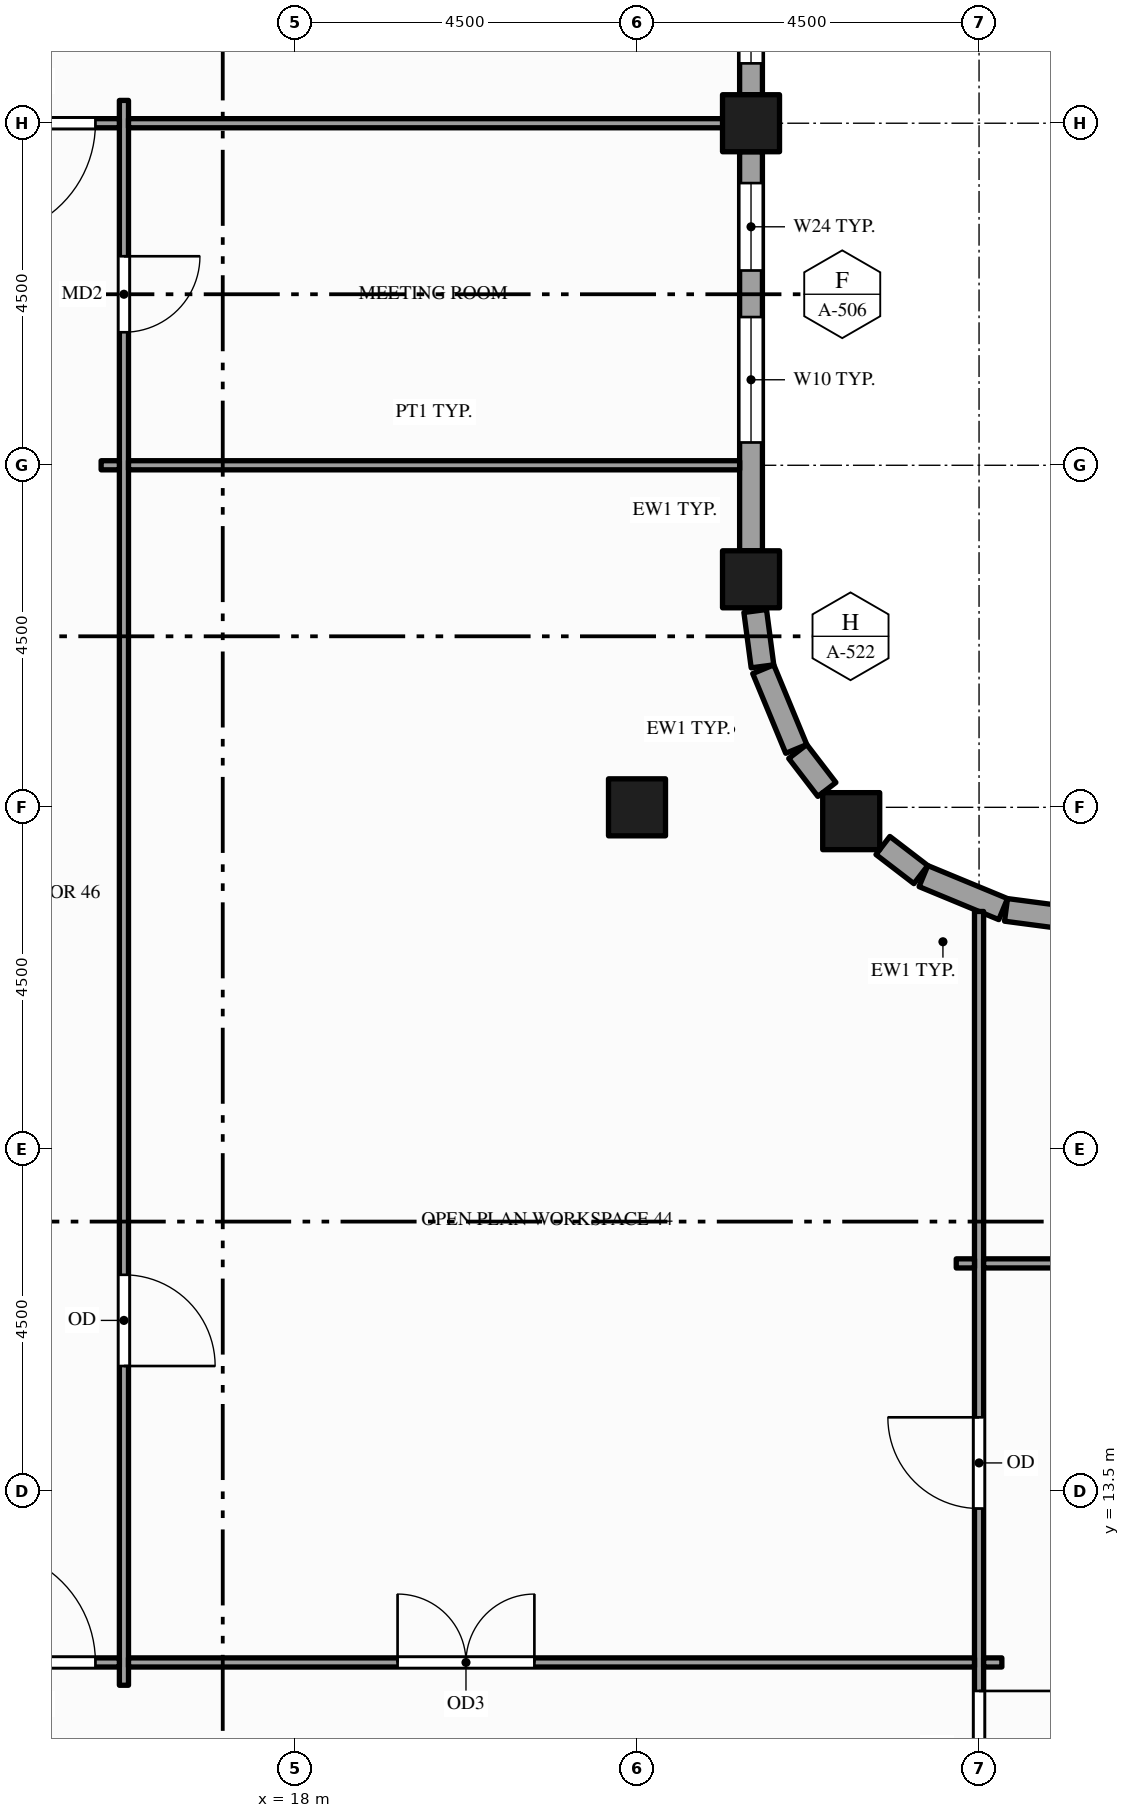
"""IFC4 building model, lengths in metres.
Left out: names, types, materials, properties, quantities, classifications, styles, units other than length and angle.
Written with IfcOpenShell. Run it as: python <this file> out.ifc"""

import sys

from ifc_helpers import new_model, si_unit, direction, frame, frame_2d, origin, origin_2d, place, context, subcontext, project, spatial, rectangle, hollow_rectangle, extrude, element, fill, save


model = new_model("IFC4")
c1 = context("Model", 3, precision=1e-05, world=origin(), true_north=direction((0.0, 1.0)))
c2 = subcontext(c1, "Body", "Model", "MODEL_VIEW")
j1 = project(units=[si_unit("LENGTHUNIT", "METRE"), si_unit("PLANEANGLEUNIT", "RADIAN")], contexts=[c1])
p1 = place(None, origin())
s1 = spatial("IfcSite", under=j1, at=p1, CompositionType="ELEMENT")
p2 = place(p1, origin())
s2 = spatial("IfcBuilding", under=s1, at=p2, CompositionType="ELEMENT")
p3 = place(p2, frame((0.0, 0.0, 227.0)))
s3 = spatial("IfcBuildingStorey", under=s2, at=p3, CompositionType="ELEMENT", Elevation=227.0)
for number, where, z_axis, x_axis in (
    (1, (22.5, 22.5, -0.15), (0.0, 0.0, 1.0), (1.0, 0.0, 0.0)),
    (2, (24.0, 25.5, -0.15), (0.0, 0.0, 1.0), (1.0, 0.0, 0.0)),
    (3, (24.0, 31.5, -0.15), (0.0, 0.0, 1.0), (1.0, 0.0, 0.0)),
    (4, (25.318, 22.318, -0.15), (0.0, 0.0, 1.0), (1.0, 0.0, 0.0)),
):
    element("IfcColumn", number, at=place(p3, frame(where, z_axis=z_axis, x_axis=x_axis)), inside=s3, PredefinedType="COLUMN", context=c2, shape_type="SweptSolid", body=[
        extrude(hollow_rectangle(XDim=0.75, YDim=0.75, WallThickness=0.036, at=origin_2d()), origin(), (0.0, 0.0, 1.0), 4.0),
    ])
p4 = place(p3, frame((28.083, 21.055, 0.0), z_axis=(0.0, 0.0, 1.0), x_axis=(-0.99142711513, 0.130660917588, 0.0)))
e5 = element("IfcWall", 5, at=p4, inside=s3, PredefinedType="STANDARD", context=c2, shape_type="SweptSolid", body=[
    extrude(rectangle(XDim=0.734, YDim=0.3, at=frame_2d((0.367, 0.0))), origin(), (0.0, 0.0, 1.0), 3.157),
])
p5 = place(p3, frame((27.317, 21.161, 0.0), z_axis=(0.0, 0.0, 1.0), x_axis=(-0.923914616768, 0.382598720491, 0.0)))
e6 = element("IfcWall", 6, at=p5, inside=s3, PredefinedType="STANDARD", context=c2, shape_type="SweptSolid", body=[
    extrude(rectangle(XDim=1.135, YDim=0.3, at=frame_2d((0.568, 0.0))), origin(), (0.0, 0.0, 1.0), 2.87),
])
p6 = place(p3, frame((26.234, 21.615, 0.0), z_axis=(0.0, 0.0, 1.0), x_axis=(-0.793575131083, 0.608472276547, 0.0)))
e7 = element("IfcWall", 7, at=p6, inside=s3, PredefinedType="STANDARD", context=c2, shape_type="SweptSolid", body=[
    extrude(rectangle(XDim=0.629, YDim=0.3, at=frame_2d((0.314, 0.0))), origin(), (0.0, 0.0, 1.0), 3.157),
])
p7 = place(p3, frame((24.998, 22.735, 0.0), z_axis=(0.0, 0.0, 1.0), x_axis=(-0.608472276547, 0.793575131083, 0.0)))
e8 = element("IfcWall", 8, at=p7, inside=s3, PredefinedType="STANDARD", context=c2, shape_type="SweptSolid", body=[
    extrude(rectangle(XDim=0.629, YDim=0.3, at=frame_2d((0.314, 0.0))), origin(), (0.0, 0.0, 1.0), 2.76),
])
p8 = place(p3, frame((24.595, 23.268, 0.0), z_axis=(0.0, 0.0, 1.0), x_axis=(-0.382598720491, 0.923914616768, 0.0)))
e9 = element("IfcWall", 9, at=p8, inside=s3, PredefinedType="STANDARD", context=c2, shape_type="SweptSolid", body=[
    extrude(rectangle(XDim=1.135, YDim=0.3, at=frame_2d((0.568, 0.0))), origin(), (0.0, 0.0, 1.0), 2.76),
])
p9 = place(p3, frame((24.151, 24.355, 0.0), z_axis=(0.0, 0.0, 1.0), x_axis=(-0.130660917588, 0.99142711513, 0.0)))
e10 = element("IfcWall", 10, at=p9, inside=s3, PredefinedType="STANDARD", context=c2, shape_type="SweptSolid", body=[
    extrude(rectangle(XDim=0.734, YDim=0.3, at=frame_2d((0.367, 0.0))), origin(), (0.0, 0.0, 1.0), 3.157),
])
p10 = place(p3, frame((24.0, 25.875, 0.0), z_axis=(0.0, 0.0, 1.0), x_axis=(0.0, 1.0, 0.0)))
e11 = element("IfcWall", 11, at=p10, inside=s3, PredefinedType="STANDARD", context=c2, shape_type="SweptSolid", body=[
    extrude(rectangle(XDim=5.25, YDim=0.3, at=frame_2d((2.625, 0.0))), origin(), (0.0, 0.0, 1.0), 3.157),
])
p11 = place(p10, frame((1.425, 0.0, 0.9)))
e12 = element("IfcOpeningElement", 12, at=p11, cuts=e11, PredefinedType="OPENING", context=c2, shape_type="SweptSolid", body=[
    extrude(rectangle(XDim=1.65, YDim=2.0, at=frame_2d((0.825, 1.0))), frame((0.0, 0.16, 0.0), z_axis=(0.0, -1.0, 0.0), x_axis=(1.0, 0.0, 0.0)), (0.0, 0.0, 1.0), 0.32),
])
p12 = place(p10, frame((3.688, 0.0, 0.9)))
e13 = element("IfcOpeningElement", 13, at=p12, cuts=e11, PredefinedType="OPENING", context=c2, shape_type="SweptSolid", body=[
    extrude(rectangle(XDim=1.15, YDim=2.0, at=frame_2d((0.575, 1.0))), frame((0.0, 0.16, 0.0), z_axis=(0.0, -1.0, 0.0), x_axis=(1.0, 0.0, 0.0)), (0.0, 0.0, 1.0), 0.32),
])
p13 = place(p3, frame((24.0, 31.875, 0.0), z_axis=(0.0, 0.0, 1.0), x_axis=(0.0, 1.0, 0.0)))
e14 = element("IfcWall", 14, at=p13, inside=s3, PredefinedType="STANDARD", context=c2, shape_type="SweptSolid", body=[
    extrude(rectangle(XDim=3.75, YDim=0.3, at=frame_2d((1.875, 0.0))), origin(), (0.0, 0.0, 1.0), 3.157),
])
p14 = place(p13, frame((0.413, 0.0, 0.9)))
e15 = element("IfcOpeningElement", 15, at=p14, cuts=e14, PredefinedType="OPENING", context=c2, shape_type="SweptSolid", body=[
    extrude(rectangle(XDim=1.15, YDim=2.0, at=frame_2d((0.575, 1.0))), frame((0.0, 0.16, 0.0), z_axis=(0.0, -1.0, 0.0), x_axis=(1.0, 0.0, 0.0)), (0.0, 0.0, 1.0), 0.32),
])
p15 = place(p13, frame((2.188, 0.0, 0.9)))
e16 = element("IfcOpeningElement", 16, at=p15, cuts=e14, PredefinedType="OPENING", context=c2, shape_type="SweptSolid", body=[
    extrude(rectangle(XDim=1.15, YDim=2.0, at=frame_2d((0.575, 1.0))), frame((0.0, 0.16, 0.0), z_axis=(0.0, -1.0, 0.0), x_axis=(1.0, 0.0, 0.0)), (0.0, 0.0, 1.0), 0.32),
])
p16 = place(p3, frame((15.75, 10.95, 0.0), z_axis=(0.0, 0.0, 1.0), x_axis=(0.0, 1.0, 0.0)))
e17 = element("IfcWall", 17, at=p16, inside=s3, PredefinedType="PARTITIONING", context=c2, shape_type="SweptSolid", body=[
    extrude(rectangle(XDim=20.85, YDim=0.12, at=frame_2d((10.425, 0.0))), origin(), (0.0, 0.0, 1.0), 2.6),
])
p17 = place(p16, frame((17.8, 0.0, 0.0)))
e18 = element("IfcOpeningElement", 18, at=p17, cuts=e17, PredefinedType="OPENING", context=c2, shape_type="SweptSolid", body=[
    extrude(rectangle(XDim=1.0, YDim=2.1, at=frame_2d((0.5, 1.05))), frame((0.0, 0.07, 0.0), z_axis=(0.0, -1.0, 0.0), x_axis=(1.0, 0.0, 0.0)), (0.0, 0.0, 1.0), 0.14),
])
p18 = place(p16, frame((4.2, 0.0, 0.0)))
e19 = element("IfcOpeningElement", 19, at=p18, cuts=e17, PredefinedType="OPENING", context=c2, shape_type="SweptSolid", body=[
    extrude(rectangle(XDim=1.2, YDim=2.1, at=frame_2d((0.6, 1.05))), frame((0.0, 0.07, 0.0), z_axis=(0.0, -1.0, 0.0), x_axis=(1.0, 0.0, 0.0)), (0.0, 0.0, 1.0), 0.14),
])
p19 = place(p3, frame((27.0, -1.35, 0.0), z_axis=(0.0, 0.0, 1.0), x_axis=(0.0, 1.0, 0.0)))
e20 = element("IfcWall", 20, at=p19, inside=s3, PredefinedType="PARTITIONING", context=c2, shape_type="SweptSolid", body=[
    extrude(rectangle(XDim=22.48, YDim=0.12, at=frame_2d((11.24, 0.0))), origin(), (0.0, 0.0, 1.0), 2.87),
])
p20 = place(p19, frame((10.725, 0.0, 0.0)))
e21 = element("IfcOpeningElement", 21, at=p20, cuts=e20, PredefinedType="OPENING", context=c2, shape_type="SweptSolid", body=[
    extrude(rectangle(XDim=1.5, YDim=2.1, at=frame_2d((0.75, 1.05))), frame((0.0, 0.07, 0.0), z_axis=(0.0, -1.0, 0.0), x_axis=(1.0, 0.0, 0.0)), (0.0, 0.0, 1.0), 0.14),
])
p21 = place(p19, frame((14.625, 0.0, 0.0)))
e22 = element("IfcOpeningElement", 22, at=p21, cuts=e20, PredefinedType="OPENING", context=c2, shape_type="SweptSolid", body=[
    extrude(rectangle(XDim=1.2, YDim=2.1, at=frame_2d((0.6, 1.05))), frame((0.0, 0.07, 0.0), z_axis=(0.0, -1.0, 0.0), x_axis=(1.0, 0.0, 0.0)), (0.0, 0.0, 1.0), 0.14),
])
p22 = place(p3, frame((13.56, 11.25, 0.0), z_axis=(0.0, 0.0, 1.0), x_axis=(1.0, 0.0, 0.0)))
e23 = element("IfcWall", 23, at=p22, inside=s3, PredefinedType="PARTITIONING", context=c2, shape_type="SweptSolid", body=[
    extrude(rectangle(XDim=2.13, YDim=0.12, at=frame_2d((1.065, 0.0))), origin(), (0.0, 0.0, 1.0), 2.87),
])
p23 = place(p22, frame((0.315, 0.0, 0.0)))
e24 = element("IfcOpeningElement", 24, at=p23, cuts=e23, PredefinedType="OPENING", context=c2, shape_type="SweptSolid", body=[
    extrude(rectangle(XDim=1.5, YDim=2.1, at=frame_2d((0.75, 1.05))), frame((0.0, 0.07, 0.0), z_axis=(0.0, -1.0, 0.0), x_axis=(1.0, 0.0, 0.0)), (0.0, 0.0, 1.0), 0.14),
])
p24 = place(p3, frame((15.81, 11.25, 0.0), z_axis=(0.0, 0.0, 1.0), x_axis=(1.0, 0.0, 0.0)))
e25 = element("IfcWall", 25, at=p24, inside=s3, PredefinedType="PARTITIONING", context=c2, shape_type="SweptSolid", body=[
    extrude(rectangle(XDim=11.13, YDim=0.12, at=frame_2d((5.565, 0.0))), origin(), (0.0, 0.0, 1.0), 2.76),
])
p25 = place(p24, frame((3.54, 0.0, 0.0)))
e26 = element("IfcOpeningElement", 26, at=p25, cuts=e25, PredefinedType="OPENING", context=c2, shape_type="SweptSolid", body=[
    extrude(rectangle(XDim=1.8, YDim=2.1, at=frame_2d((0.9, 1.05))), frame((0.0, 0.07, 0.0), z_axis=(0.0, -1.0, 0.0), x_axis=(1.0, 0.0, 0.0)), (0.0, 0.0, 1.0), 0.14),
])
for number, where, z_axis, x_axis in (
    (27, (27.06, 11.25, 0.0), (0.0, 0.0, 1.0), (1.0, 0.0, 0.0)),
    (28, (26.7, 16.5, 0.0), (0.0, 0.0, 1.0), (1.0, 0.0, 0.0)),
):
    element("IfcWall", number, at=place(p3, frame(where, z_axis=z_axis, x_axis=x_axis)), inside=s3, PredefinedType="PARTITIONING", context=c2, shape_type="SweptSolid", body=[
        extrude(rectangle(XDim=0.24, YDim=0.12, at=frame_2d((0.12, 0.0))), origin(), (0.0, 0.0, 1.0), 2.87),
    ])
p26 = place(p3, frame((27.06, 16.5, 0.0), z_axis=(0.0, 0.0, 1.0), x_axis=(1.0, 0.0, 0.0)))
e29 = element("IfcWall", 29, at=p26, inside=s3, PredefinedType="PARTITIONING", context=c2, shape_type="SweptSolid", body=[
    extrude(rectangle(XDim=2.13, YDim=0.12, at=frame_2d((1.065, 0.0))), origin(), (0.0, 0.0, 1.0), 2.87),
])
p27 = place(p3, frame((15.45, 27.0, 0.0), z_axis=(0.0, 0.0, 1.0), x_axis=(1.0, 0.0, 0.0)))
e30 = element("IfcWall", 30, at=p27, inside=s3, PredefinedType="PARTITIONING", context=c2, shape_type="SweptSolid", body=[
    extrude(rectangle(XDim=0.24, YDim=0.12, at=frame_2d((0.12, 0.0))), origin(), (0.0, 0.0, 1.0), 2.87),
])
p28 = place(p3, frame((15.81, 27.0, 0.0), z_axis=(0.0, 0.0, 1.0), x_axis=(1.0, 0.0, 0.0)))
e31 = element("IfcWall", 31, at=p28, inside=s3, PredefinedType="PARTITIONING", context=c2, shape_type="SweptSolid", body=[
    extrude(rectangle(XDim=8.04, YDim=0.12, at=frame_2d((4.02, 0.0))), origin(), (0.0, 0.0, 1.0), 2.87),
])
p29 = place(p3, frame((13.56, 31.5, 0.0), z_axis=(0.0, 0.0, 1.0), x_axis=(1.0, 0.0, 0.0)))
e32 = element("IfcWall", 32, at=p29, inside=s3, PredefinedType="PARTITIONING", context=c2, shape_type="SweptSolid", body=[
    extrude(rectangle(XDim=2.13, YDim=0.12, at=frame_2d((1.065, 0.0))), origin(), (0.0, 0.0, 1.0), 2.87),
])
p30 = place(p29, frame((0.315, 0.0, 0.0)))
e33 = element("IfcOpeningElement", 33, at=p30, cuts=e32, PredefinedType="OPENING", context=c2, shape_type="SweptSolid", body=[
    extrude(rectangle(XDim=1.5, YDim=2.1, at=frame_2d((0.75, 1.05))), frame((0.0, 0.07, 0.0), z_axis=(0.0, -1.0, 0.0), x_axis=(1.0, 0.0, 0.0)), (0.0, 0.0, 1.0), 0.14),
])
p31 = place(p3, frame((15.81, 31.5, 0.0), z_axis=(0.0, 0.0, 1.0), x_axis=(1.0, 0.0, 0.0)))
e34 = element("IfcWall", 34, at=p31, inside=s3, PredefinedType="PARTITIONING", context=c2, shape_type="SweptSolid", body=[
    extrude(rectangle(XDim=8.04, YDim=0.12, at=frame_2d((4.02, 0.0))), origin(), (0.0, 0.0, 1.0), 2.87),
])
p32 = place(p11, origin())
e35 = element("IfcWindow", 35, at=p32, inside=s3, PartitioningType="SINGLE_PANEL", PredefinedType="WINDOW", context=c2, shape_type="SweptSolid", body=[
    extrude(rectangle(XDim=1.65, YDim=2.0, at=frame_2d((0.825, 1.0))), frame((0.0, 0.03, 0.0), z_axis=(0.0, -1.0, 0.0), x_axis=(1.0, 0.0, 0.0)), (0.0, 0.0, 1.0), 0.06),
])
fill(e12, e35)
p33 = place(p12, origin())
e36 = element("IfcWindow", 36, at=p33, inside=s3, PartitioningType="SINGLE_PANEL", PredefinedType="WINDOW", context=c2, shape_type="SweptSolid", body=[
    extrude(rectangle(XDim=1.15, YDim=2.0, at=frame_2d((0.575, 1.0))), frame((0.0, 0.03, 0.0), z_axis=(0.0, -1.0, 0.0), x_axis=(1.0, 0.0, 0.0)), (0.0, 0.0, 1.0), 0.06),
])
fill(e13, e36)
p34 = place(p14, origin())
e37 = element("IfcWindow", 37, at=p34, inside=s3, PartitioningType="SINGLE_PANEL", PredefinedType="WINDOW", context=c2, shape_type="SweptSolid", body=[
    extrude(rectangle(XDim=1.15, YDim=2.0, at=frame_2d((0.575, 1.0))), frame((0.0, 0.03, 0.0), z_axis=(0.0, -1.0, 0.0), x_axis=(1.0, 0.0, 0.0)), (0.0, 0.0, 1.0), 0.06),
])
fill(e15, e37)
p35 = place(p20, origin())
e38 = element("IfcDoor", 38, at=p35, inside=s3, OperationType="SINGLE_SWING_RIGHT", PredefinedType="DOOR", context=c2, shape_type="SweptSolid", body=[
    extrude(rectangle(XDim=1.5, YDim=2.1, at=frame_2d((0.75, 1.05))), frame((0.0, 0.025, 0.0), z_axis=(0.0, -1.0, 0.0), x_axis=(1.0, 0.0, 0.0)), (0.0, 0.0, 1.0), 0.05),
])
fill(e21, e38)
p36 = place(p25, origin())
e39 = element("IfcDoor", 39, at=p36, inside=s3, OperationType="DOUBLE_DOOR_SINGLE_SWING", PredefinedType="DOOR", context=c2, shape_type="SweptSolid", body=[
    extrude(rectangle(XDim=1.8, YDim=2.1, at=frame_2d((0.9, 1.05))), frame((0.0, 0.025, 0.0), z_axis=(0.0, -1.0, 0.0), x_axis=(1.0, 0.0, 0.0)), (0.0, 0.0, 1.0), 0.05),
])
fill(e26, e39)
p37 = place(p23, origin())
e40 = element("IfcDoor", 40, at=p37, inside=s3, OperationType="SINGLE_SWING_LEFT", PredefinedType="DOOR", context=c2, shape_type="SweptSolid", body=[
    extrude(rectangle(XDim=1.5, YDim=2.1, at=frame_2d((0.75, 1.05))), frame((0.0, 0.025, 0.0), z_axis=(0.0, -1.0, 0.0), x_axis=(1.0, 0.0, 0.0)), (0.0, 0.0, 1.0), 0.05),
])
fill(e24, e40)
p38 = place(p30, origin())
e41 = element("IfcDoor", 41, at=p38, inside=s3, OperationType="SINGLE_SWING_LEFT", PredefinedType="DOOR", context=c2, shape_type="SweptSolid", body=[
    extrude(rectangle(XDim=1.5, YDim=2.1, at=frame_2d((0.75, 1.05))), frame((0.0, 0.025, 0.0), z_axis=(0.0, -1.0, 0.0), x_axis=(1.0, 0.0, 0.0)), (0.0, 0.0, 1.0), 0.05),
])
fill(e33, e41)
p39 = place(p17, origin())
e42 = element("IfcDoor", 42, at=p39, inside=s3, OperationType="SINGLE_SWING_RIGHT", PredefinedType="DOOR", context=c2, shape_type="SweptSolid", body=[
    extrude(rectangle(XDim=1.0, YDim=2.1, at=frame_2d((0.5, 1.05))), frame((0.0, 0.025, 0.0), z_axis=(0.0, -1.0, 0.0), x_axis=(1.0, 0.0, 0.0)), (0.0, 0.0, 1.0), 0.05),
])
fill(e18, e42)
p40 = place(p18, origin())
e43 = element("IfcDoor", 43, at=p40, inside=s3, OperationType="SINGLE_SWING_LEFT", PredefinedType="DOOR", context=c2, shape_type="SweptSolid", body=[
    extrude(rectangle(XDim=1.2, YDim=2.1, at=frame_2d((0.6, 1.05))), frame((0.0, 0.025, 0.0), z_axis=(0.0, -1.0, 0.0), x_axis=(1.0, 0.0, 0.0)), (0.0, 0.0, 1.0), 0.05),
])
fill(e19, e43)
p41 = place(p21, origin())
e44 = element("IfcDoor", 44, at=p41, inside=s3, OperationType="SINGLE_SWING_RIGHT", PredefinedType="DOOR", context=c2, shape_type="SweptSolid", body=[
    extrude(rectangle(XDim=1.2, YDim=2.1, at=frame_2d((0.6, 1.05))), frame((0.0, 0.025, 0.0), z_axis=(0.0, -1.0, 0.0), x_axis=(1.0, 0.0, 0.0)), (0.0, 0.0, 1.0), 0.05),
])
fill(e22, e44)
save(model, sys.argv[1])
